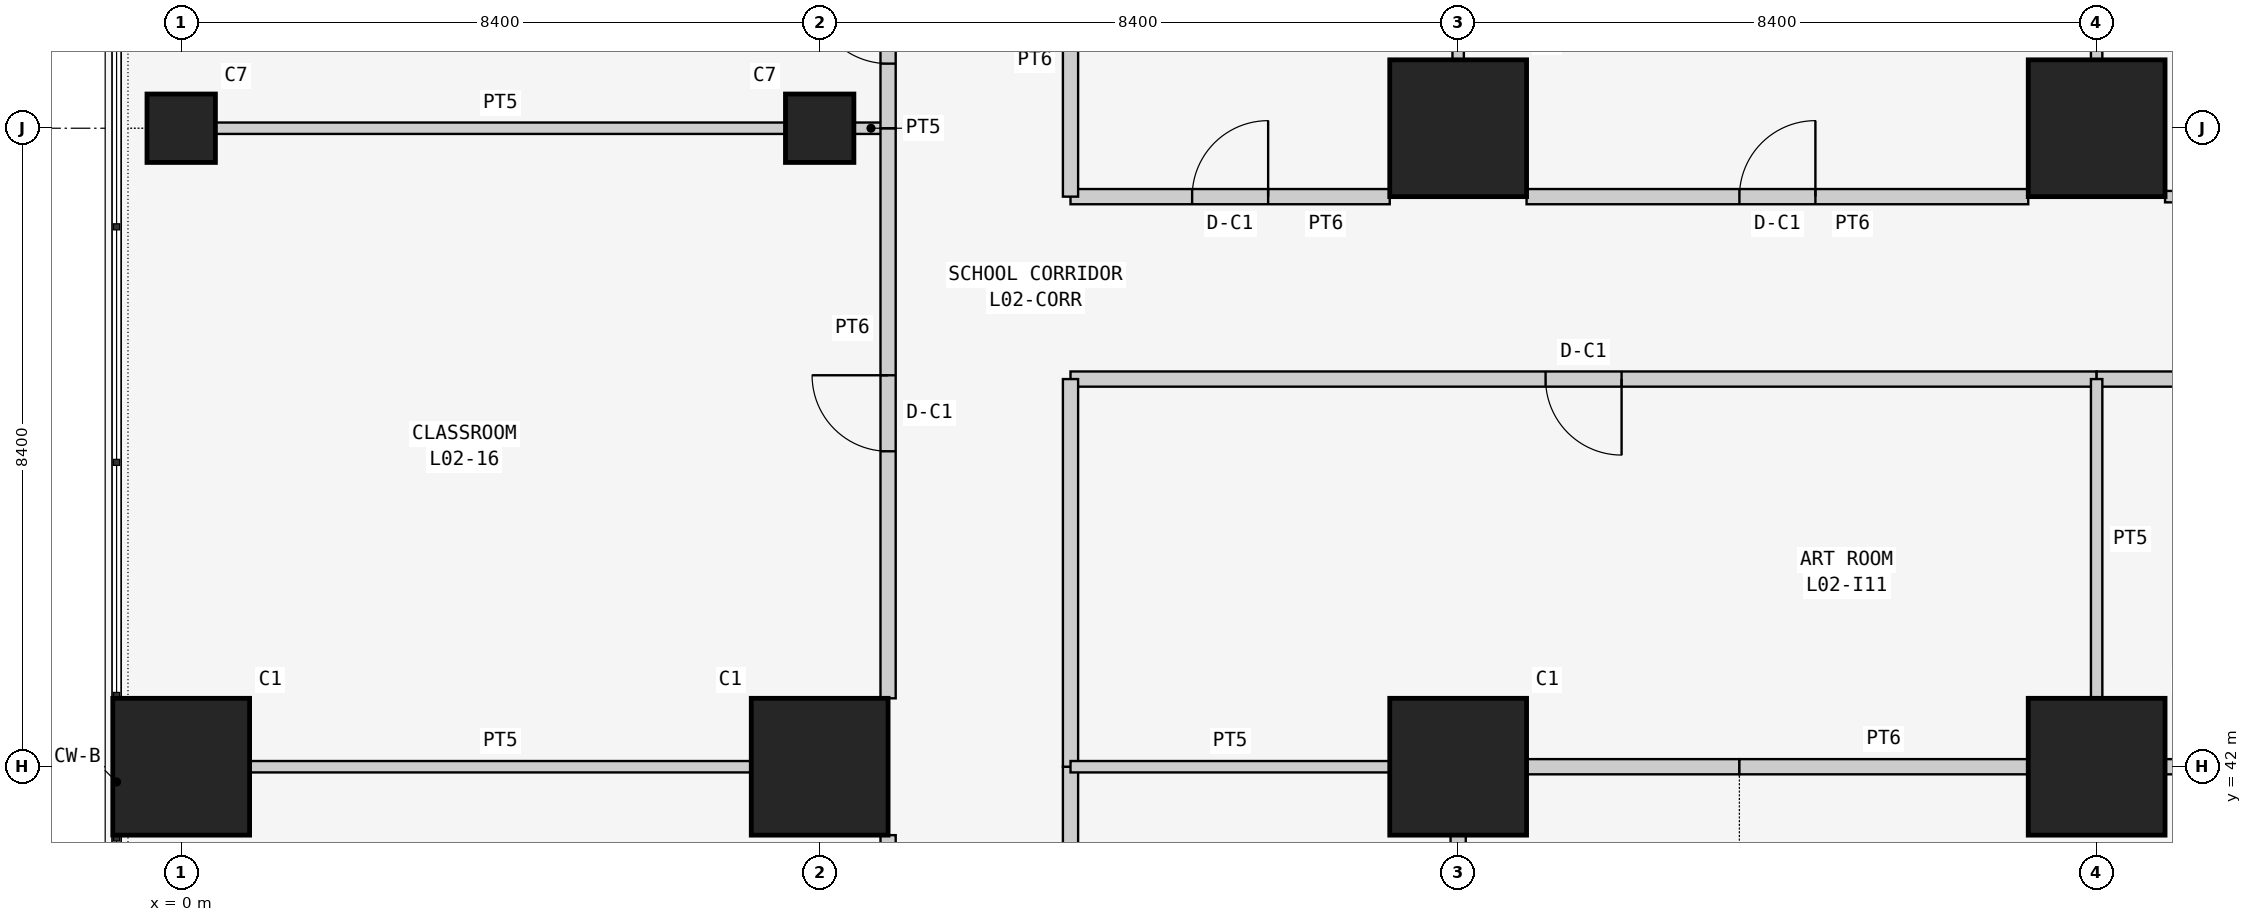
"""IFC4 building model, lengths in metres.
Left out: names, types, materials, properties, quantities, classifications, styles, units other than length and angle.
Written with IfcOpenShell. Run it as: python <this file> out.ifc"""

import sys

from ifc_helpers import new_model, si_unit, direction, frame, frame_2d, origin, origin_2d, place, context, subcontext, project, spatial, rectangle, extrude, element, fill, save


model = new_model("IFC4")
c1 = context("Model", 3, precision=1e-05, world=origin(), true_north=direction((0.0, 1.0)))
c2 = subcontext(c1, "Body", "Model", "MODEL_VIEW")
j1 = project(units=[si_unit("LENGTHUNIT", "METRE"), si_unit("PLANEANGLEUNIT", "RADIAN")], contexts=[c1])
p1 = place(None, origin())
s1 = spatial("IfcSite", under=j1, at=p1, CompositionType="ELEMENT")
p2 = place(p1, origin())
s2 = spatial("IfcBuilding", under=s1, at=p2, CompositionType="ELEMENT")
p3 = place(p2, frame((0.0, 0.0, 10.5)))
s3 = spatial("IfcBuildingStorey", under=s2, at=p3, CompositionType="ELEMENT", Elevation=10.5)
p4 = place(p3, frame((0.0, 42.0, 0.0), z_axis=(0.0, 0.0, 1.0), x_axis=(1.0, 0.0, 0.0)))
e1 = element("IfcColumn", 1, at=p4, inside=s3, PredefinedType="COLUMN", context=c2, shape_type="SweptSolid", body=[
    extrude(rectangle(XDim=1.8, YDim=1.8, at=origin_2d()), origin(), (0.0, 0.0, 1.0), 4.5),
])
p5 = place(p3, frame((0.0, 50.4, 0.0), z_axis=(0.0, 0.0, 1.0), x_axis=(1.0, 0.0, 0.0)))
e2 = element("IfcColumn", 2, at=p5, inside=s3, PredefinedType="COLUMN", context=c2, shape_type="SweptSolid", body=[
    extrude(rectangle(XDim=0.9, YDim=0.9, at=origin_2d()), origin(), (0.0, 0.0, 1.0), 4.5),
])
p6 = place(p3, frame((8.4, 42.0, 0.0), z_axis=(0.0, 0.0, 1.0), x_axis=(1.0, 0.0, 0.0)))
e3 = element("IfcColumn", 3, at=p6, inside=s3, PredefinedType="COLUMN", context=c2, shape_type="SweptSolid", body=[
    extrude(rectangle(XDim=1.8, YDim=1.8, at=origin_2d()), origin(), (0.0, 0.0, 1.0), 4.5),
])
p7 = place(p3, frame((8.4, 50.4, 0.0), z_axis=(0.0, 0.0, 1.0), x_axis=(1.0, 0.0, 0.0)))
e4 = element("IfcColumn", 4, at=p7, inside=s3, PredefinedType="COLUMN", context=c2, shape_type="SweptSolid", body=[
    extrude(rectangle(XDim=0.9, YDim=0.9, at=origin_2d()), origin(), (0.0, 0.0, 1.0), 4.5),
])
for number, where, z_axis, x_axis in (
    (5, (16.8, 42.0, 0.0), (0.0, 0.0, 1.0), (1.0, 0.0, 0.0)),
    (6, (16.8, 50.4, 0.0), (0.0, 0.0, 1.0), (1.0, 0.0, 0.0)),
    (7, (25.2, 42.0, 0.0), (0.0, 0.0, 1.0), (1.0, 0.0, 0.0)),
    (8, (25.2, 50.4, 0.0), (0.0, 0.0, 1.0), (1.0, 0.0, 0.0)),
):
    element("IfcColumn", number, at=place(p3, frame(where, z_axis=z_axis, x_axis=x_axis)), inside=s3, PredefinedType="COLUMN", context=c2, shape_type="SweptSolid", body=[
        extrude(rectangle(XDim=1.8, YDim=1.8, at=origin_2d()), origin(), (0.0, 0.0, 1.0), 4.5),
    ])
p8 = place(p3, frame((25.2, 51.3, 0.0), z_axis=(0.0, 0.0, 1.0), x_axis=(0.0, 1.0, 0.0)))
e9 = element("IfcWall", 9, at=p8, inside=s3, PredefinedType="PARTITIONING", context=c2, shape_type="SweptSolid", body=[
    extrude(rectangle(XDim=6.6, YDim=0.15, at=frame_2d((3.3, 0.0))), origin(), (0.0, 0.0, 1.0), 3.543),
])
p9 = place(p3, frame((28.3, 49.5, 0.0), z_axis=(0.0, 0.0, 1.0), x_axis=(-1.0, 0.0, 0.0)))
e10 = element("IfcWall", 10, at=p9, inside=s3, PredefinedType="PARTITIONING", context=c2, shape_type="SweptSolid", body=[
    extrude(rectangle(XDim=2.2, YDim=0.15, at=frame_2d((1.1, 0.0))), origin(), (0.0, 0.0, 1.0), 4.3),
])
p10 = place(p9, frame((0.65, 0.0, 0.0)))
e11 = element("IfcOpeningElement", 11, at=p10, cuts=e10, PredefinedType="OPENING", context=c2, shape_type="SweptSolid", body=[
    extrude(rectangle(XDim=0.9, YDim=2.1, at=frame_2d((0.45, 1.05))), frame((0.0, 0.085, 0.0), z_axis=(0.0, -1.0, 0.0), x_axis=(1.0, 0.0, 0.0)), (0.0, 0.0, 1.0), 0.17),
])
p11 = place(p3, frame((0.9, 42.0, 0.0), z_axis=(0.0, 0.0, 1.0), x_axis=(1.0, 0.0, 0.0)))
e12 = element("IfcWall", 12, at=p11, inside=s3, PredefinedType="PARTITIONING", context=c2, shape_type="SweptSolid", body=[
    extrude(rectangle(XDim=6.6, YDim=0.15, at=frame_2d((3.3, 0.0))), origin(), (0.0, 0.0, 1.0), 3.543),
])
p12 = place(p3, frame((9.3, 41.1, 0.0), z_axis=(0.0, 0.0, 1.0), x_axis=(0.0, -1.0, 0.0)))
e13 = element("IfcWall", 13, at=p12, inside=s3, PredefinedType="PARTITIONING", context=c2, shape_type="SweptSolid", body=[
    extrude(rectangle(XDim=6.6, YDim=0.2, at=frame_2d((3.3, 0.0))), origin(), (0.0, 0.0, 1.0), 4.3),
])
p13 = place(p12, frame((2.8, 0.0, 0.0)))
e14 = element("IfcOpeningElement", 14, at=p13, cuts=e13, PredefinedType="OPENING", context=c2, shape_type="SweptSolid", body=[
    extrude(rectangle(XDim=1.0, YDim=2.1, at=frame_2d((0.5, 1.05))), frame((0.0, 0.11, 0.0), z_axis=(0.0, -1.0, 0.0), x_axis=(1.0, 0.0, 0.0)), (0.0, 0.0, 1.0), 0.22),
])
p14 = place(p3, frame((0.45, 50.4, 0.0), z_axis=(0.0, 0.0, 1.0), x_axis=(1.0, 0.0, 0.0)))
e15 = element("IfcWall", 15, at=p14, inside=s3, PredefinedType="PARTITIONING", context=c2, shape_type="SweptSolid", body=[
    extrude(rectangle(XDim=7.5, YDim=0.15, at=frame_2d((3.75, 0.0))), origin(), (0.0, 0.0, 1.0), 3.543),
])
p15 = place(p3, frame((8.85, 50.4, 0.0), z_axis=(0.0, 0.0, 1.0), x_axis=(1.0, 0.0, 0.0)))
e16 = element("IfcWall", 16, at=p15, inside=s3, PredefinedType="PARTITIONING", context=c2, shape_type="SweptSolid", body=[
    extrude(rectangle(XDim=0.45, YDim=0.15, at=frame_2d((0.225, 0.0))), origin(), (0.0, 0.0, 1.0), 3.543),
])
p16 = place(p3, frame((9.3, 50.4, 0.0), z_axis=(0.0, 0.0, 1.0), x_axis=(0.0, -1.0, 0.0)))
e17 = element("IfcWall", 17, at=p16, inside=s3, PredefinedType="PARTITIONING", context=c2, shape_type="SweptSolid", body=[
    extrude(rectangle(XDim=7.5, YDim=0.2, at=frame_2d((3.75, 0.0))), origin(), (0.0, 0.0, 1.0), 4.3),
])
p17 = place(p16, frame((3.25, 0.0, 0.0)))
e18 = element("IfcOpeningElement", 18, at=p17, cuts=e17, PredefinedType="OPENING", context=c2, shape_type="SweptSolid", body=[
    extrude(rectangle(XDim=1.0, YDim=2.1, at=frame_2d((0.5, 1.05))), frame((0.0, 0.11, 0.0), z_axis=(0.0, -1.0, 0.0), x_axis=(1.0, 0.0, 0.0)), (0.0, 0.0, 1.0), 0.22),
])
p18 = place(p3, frame((16.8, 51.3, 0.0), z_axis=(0.0, 0.0, 1.0), x_axis=(0.0, 1.0, 0.0)))
e19 = element("IfcWall", 19, at=p18, inside=s3, PredefinedType="PARTITIONING", context=c2, shape_type="SweptSolid", body=[
    extrude(rectangle(XDim=6.6, YDim=0.15, at=frame_2d((3.3, 0.0))), origin(), (0.0, 0.0, 1.0), 3.543),
])
p19 = place(p3, frame((24.3, 49.5, 0.0), z_axis=(0.0, 0.0, 1.0), x_axis=(-1.0, 0.0, 0.0)))
e20 = element("IfcWall", 20, at=p19, inside=s3, PredefinedType="PARTITIONING", context=c2, shape_type="SweptSolid", body=[
    extrude(rectangle(XDim=6.6, YDim=0.2, at=frame_2d((3.3, 0.0))), origin(), (0.0, 0.0, 1.0), 4.3),
])
p20 = place(p19, frame((2.8, 0.0, 0.0)))
e21 = element("IfcOpeningElement", 21, at=p20, cuts=e20, PredefinedType="OPENING", context=c2, shape_type="SweptSolid", body=[
    extrude(rectangle(XDim=1.0, YDim=2.1, at=frame_2d((0.5, 1.05))), frame((0.0, 0.11, 0.0), z_axis=(0.0, -1.0, 0.0), x_axis=(1.0, 0.0, 0.0)), (0.0, 0.0, 1.0), 0.22),
])
p21 = place(p3, frame((9.3, 53.1, 0.0), z_axis=(0.0, 0.0, 1.0), x_axis=(0.0, -1.0, 0.0)))
e22 = element("IfcWall", 22, at=p21, inside=s3, PredefinedType="PARTITIONING", context=c2, shape_type="SweptSolid", body=[
    extrude(rectangle(XDim=2.7, YDim=0.2, at=frame_2d((1.35, 0.0))), origin(), (0.0, 0.0, 1.0), 4.3),
])
p22 = place(p21, frame((0.85, 0.0, 0.0)))
e23 = element("IfcOpeningElement", 23, at=p22, cuts=e22, PredefinedType="OPENING", context=c2, shape_type="SweptSolid", body=[
    extrude(rectangle(XDim=1.0, YDim=2.1, at=frame_2d((0.5, 1.05))), frame((0.0, 0.11, 0.0), z_axis=(0.0, -1.0, 0.0), x_axis=(1.0, 0.0, 0.0)), (0.0, 0.0, 1.0), 0.22),
])
p23 = place(p3, frame((15.9, 49.5, 0.0), z_axis=(0.0, 0.0, 1.0), x_axis=(-1.0, 0.0, 0.0)))
e24 = element("IfcWall", 24, at=p23, inside=s3, PredefinedType="PARTITIONING", context=c2, shape_type="SweptSolid", body=[
    extrude(rectangle(XDim=4.2, YDim=0.2, at=frame_2d((2.1, 0.0))), origin(), (0.0, 0.0, 1.0), 4.3),
])
p24 = place(p23, frame((1.6, 0.0, 0.0)))
e25 = element("IfcOpeningElement", 25, at=p24, cuts=e24, PredefinedType="OPENING", context=c2, shape_type="SweptSolid", body=[
    extrude(rectangle(XDim=1.0, YDim=2.1, at=frame_2d((0.5, 1.05))), frame((0.0, 0.11, 0.0), z_axis=(0.0, -1.0, 0.0), x_axis=(1.0, 0.0, 0.0)), (0.0, 0.0, 1.0), 0.22),
])
p25 = place(p3, frame((11.7, 49.5, 0.0), z_axis=(0.0, 0.0, 1.0), x_axis=(0.0, 1.0, 0.0)))
e26 = element("IfcWall", 26, at=p25, inside=s3, PredefinedType="PARTITIONING", context=c2, shape_type="SweptSolid", body=[
    extrude(rectangle(XDim=3.6, YDim=0.2, at=frame_2d((1.8, 0.0))), origin(), (0.0, 0.0, 1.0), 4.3),
])
p26 = place(p3, frame((11.7, 42.0, 0.0), z_axis=(0.0, 0.0, 1.0), x_axis=(0.0, -1.0, 0.0)))
e27 = element("IfcWall", 27, at=p26, inside=s3, PredefinedType="PARTITIONING", context=c2, shape_type="SweptSolid", body=[
    extrude(rectangle(XDim=8.4, YDim=0.2, at=frame_2d((4.2, 0.0))), origin(), (0.0, 0.0, 1.0), 4.3),
])
p27 = place(p26, frame((3.7, 0.0, 0.0)))
e28 = element("IfcOpeningElement", 28, at=p27, cuts=e27, PredefinedType="OPENING", context=c2, shape_type="SweptSolid", body=[
    extrude(rectangle(XDim=1.0, YDim=2.1, at=frame_2d((0.5, 1.05))), frame((0.0, 0.11, 0.0), z_axis=(0.0, -1.0, 0.0), x_axis=(1.0, 0.0, 0.0)), (0.0, 0.0, 1.0), 0.22),
])
p28 = place(p3, frame((25.2, 47.1, 0.0), z_axis=(0.0, 0.0, 1.0), x_axis=(-1.0, 0.0, 0.0)))
e29 = element("IfcWall", 29, at=p28, inside=s3, PredefinedType="PARTITIONING", context=c2, shape_type="SweptSolid", body=[
    extrude(rectangle(XDim=13.5, YDim=0.2, at=frame_2d((6.75, 0.0))), origin(), (0.0, 0.0, 1.0), 4.3),
])
p29 = place(p28, frame((6.25, 0.0, 0.0)))
e30 = element("IfcOpeningElement", 30, at=p29, cuts=e29, PredefinedType="OPENING", context=c2, shape_type="SweptSolid", body=[
    extrude(rectangle(XDim=1.0, YDim=2.1, at=frame_2d((0.5, 1.05))), frame((0.0, 0.11, 0.0), z_axis=(0.0, -1.0, 0.0), x_axis=(1.0, 0.0, 0.0)), (0.0, 0.0, 1.0), 0.22),
])
p30 = place(p3, frame((11.7, 47.1, 0.0), z_axis=(0.0, 0.0, 1.0), x_axis=(0.0, -1.0, 0.0)))
e31 = element("IfcWall", 31, at=p30, inside=s3, PredefinedType="PARTITIONING", context=c2, shape_type="SweptSolid", body=[
    extrude(rectangle(XDim=5.1, YDim=0.2, at=frame_2d((2.55, 0.0))), origin(), (0.0, 0.0, 1.0), 4.3),
])
p31 = place(p3, frame((42.0, 47.1, 0.0), z_axis=(0.0, 0.0, 1.0), x_axis=(-1.0, 0.0, 0.0)))
e32 = element("IfcWall", 32, at=p31, inside=s3, PredefinedType="PARTITIONING", context=c2, shape_type="SweptSolid", body=[
    extrude(rectangle(XDim=16.8, YDim=0.2, at=frame_2d((8.4, 0.0))), origin(), (0.0, 0.0, 1.0), 4.3),
])
p32 = place(p31, frame((7.9, 0.0, 0.0)))
e33 = element("IfcOpeningElement", 33, at=p32, cuts=e32, PredefinedType="OPENING", context=c2, shape_type="SweptSolid", body=[
    extrude(rectangle(XDim=1.0, YDim=2.1, at=frame_2d((0.5, 1.05))), frame((0.0, 0.11, 0.0), z_axis=(0.0, -1.0, 0.0), x_axis=(1.0, 0.0, 0.0)), (0.0, 0.0, 1.0), 0.22),
])
p33 = place(p3, frame((16.8, 34.5, 0.0), z_axis=(0.0, 0.0, 1.0), x_axis=(0.0, 1.0, 0.0)))
e34 = element("IfcWall", 34, at=p33, inside=s3, PredefinedType="PARTITIONING", context=c2, shape_type="SweptSolid", body=[
    extrude(rectangle(XDim=6.6, YDim=0.2, at=frame_2d((3.3, 0.0))), origin(), (0.0, 0.0, 1.0), 3.543),
])
p34 = place(p3, frame((17.7, 42.0, 0.0), z_axis=(0.0, 0.0, 1.0), x_axis=(1.0, 0.0, 0.0)))
e35 = element("IfcWall", 35, at=p34, inside=s3, PredefinedType="PARTITIONING", context=c2, shape_type="SweptSolid", body=[
    extrude(rectangle(XDim=2.8, YDim=0.2, at=frame_2d((1.4, 0.0))), origin(), (0.0, 0.0, 1.0), 3.543),
])
p35 = place(p3, frame((20.5, 42.0, 0.0), z_axis=(0.0, 0.0, 1.0), x_axis=(1.0, 0.0, 0.0)))
e36 = element("IfcWall", 36, at=p35, inside=s3, PredefinedType="PARTITIONING", context=c2, shape_type="SweptSolid", body=[
    extrude(rectangle(XDim=3.8, YDim=0.2, at=frame_2d((1.9, 0.0))), origin(), (0.0, 0.0, 1.0), 3.543),
])
p36 = place(p3, frame((26.1, 42.0, 0.0), z_axis=(0.0, 0.0, 1.0), x_axis=(1.0, 0.0, 0.0)))
e37 = element("IfcWall", 37, at=p36, inside=s3, PredefinedType="PARTITIONING", context=c2, shape_type="SweptSolid", body=[
    extrude(rectangle(XDim=6.6, YDim=0.2, at=frame_2d((3.3, 0.0))), origin(), (0.0, 0.0, 1.0), 3.543),
])
p37 = place(p3, frame((11.7, 42.0, 0.0), z_axis=(0.0, 0.0, 1.0), x_axis=(1.0, 0.0, 0.0)))
e38 = element("IfcWall", 38, at=p37, inside=s3, PredefinedType="PARTITIONING", context=c2, shape_type="SweptSolid", body=[
    extrude(rectangle(XDim=4.2, YDim=0.15, at=frame_2d((2.1, 0.0))), origin(), (0.0, 0.0, 1.0), 3.543),
])
p38 = place(p3, frame((25.2, 47.1, 0.0), z_axis=(0.0, 0.0, 1.0), x_axis=(0.0, -1.0, 0.0)))
e39 = element("IfcWall", 39, at=p38, inside=s3, PredefinedType="PARTITIONING", context=c2, shape_type="SweptSolid", body=[
    extrude(rectangle(XDim=4.2, YDim=0.15, at=frame_2d((2.1, 0.0))), origin(), (0.0, 0.0, 1.0), 3.543),
])
p39 = place(p17, frame((1.0, 0.0, 0.0), z_axis=(0.0, 0.0, 1.0), x_axis=(-1.0, 0.0, 0.0)))
e40 = element("IfcDoor", 40, at=p39, inside=s3, OperationType="SINGLE_SWING_RIGHT", PredefinedType="DOOR", context=c2, shape_type="SweptSolid", body=[
    extrude(rectangle(XDim=1.0, YDim=2.1, at=frame_2d((0.5, 1.05))), frame((0.0, 0.025, 0.0), z_axis=(0.0, -1.0, 0.0), x_axis=(1.0, 0.0, 0.0)), (0.0, 0.0, 1.0), 0.05),
])
fill(e18, e40)
p40 = place(p20, frame((1.0, 0.0, 0.0), z_axis=(0.0, 0.0, 1.0), x_axis=(-1.0, 0.0, 0.0)))
e41 = element("IfcDoor", 41, at=p40, inside=s3, OperationType="SINGLE_SWING_RIGHT", PredefinedType="DOOR", context=c2, shape_type="SweptSolid", body=[
    extrude(rectangle(XDim=1.0, YDim=2.1, at=frame_2d((0.5, 1.05))), frame((0.0, 0.025, 0.0), z_axis=(0.0, -1.0, 0.0), x_axis=(1.0, 0.0, 0.0)), (0.0, 0.0, 1.0), 0.05),
])
fill(e21, e41)
p41 = place(p22, frame((1.0, 0.0, 0.0), z_axis=(0.0, 0.0, 1.0), x_axis=(-1.0, 0.0, 0.0)))
e42 = element("IfcDoor", 42, at=p41, inside=s3, OperationType="SINGLE_SWING_RIGHT", PredefinedType="DOOR", context=c2, shape_type="SweptSolid", body=[
    extrude(rectangle(XDim=1.0, YDim=2.1, at=frame_2d((0.5, 1.05))), frame((0.0, 0.025, 0.0), z_axis=(0.0, -1.0, 0.0), x_axis=(1.0, 0.0, 0.0)), (0.0, 0.0, 1.0), 0.05),
])
fill(e23, e42)
p42 = place(p24, frame((1.0, 0.0, 0.0), z_axis=(0.0, 0.0, 1.0), x_axis=(-1.0, 0.0, 0.0)))
e43 = element("IfcDoor", 43, at=p42, inside=s3, OperationType="SINGLE_SWING_RIGHT", PredefinedType="DOOR", context=c2, shape_type="SweptSolid", body=[
    extrude(rectangle(XDim=1.0, YDim=2.1, at=frame_2d((0.5, 1.05))), frame((0.0, 0.025, 0.0), z_axis=(0.0, -1.0, 0.0), x_axis=(1.0, 0.0, 0.0)), (0.0, 0.0, 1.0), 0.05),
])
fill(e25, e43)
p43 = place(p29, origin())
e44 = element("IfcDoor", 44, at=p43, inside=s3, OperationType="SINGLE_SWING_LEFT", PredefinedType="DOOR", context=c2, shape_type="SweptSolid", body=[
    extrude(rectangle(XDim=1.0, YDim=2.1, at=frame_2d((0.5, 1.05))), frame((0.0, 0.025, 0.0), z_axis=(0.0, -1.0, 0.0), x_axis=(1.0, 0.0, 0.0)), (0.0, 0.0, 1.0), 0.05),
])
fill(e30, e44)
save(model, sys.argv[1])
